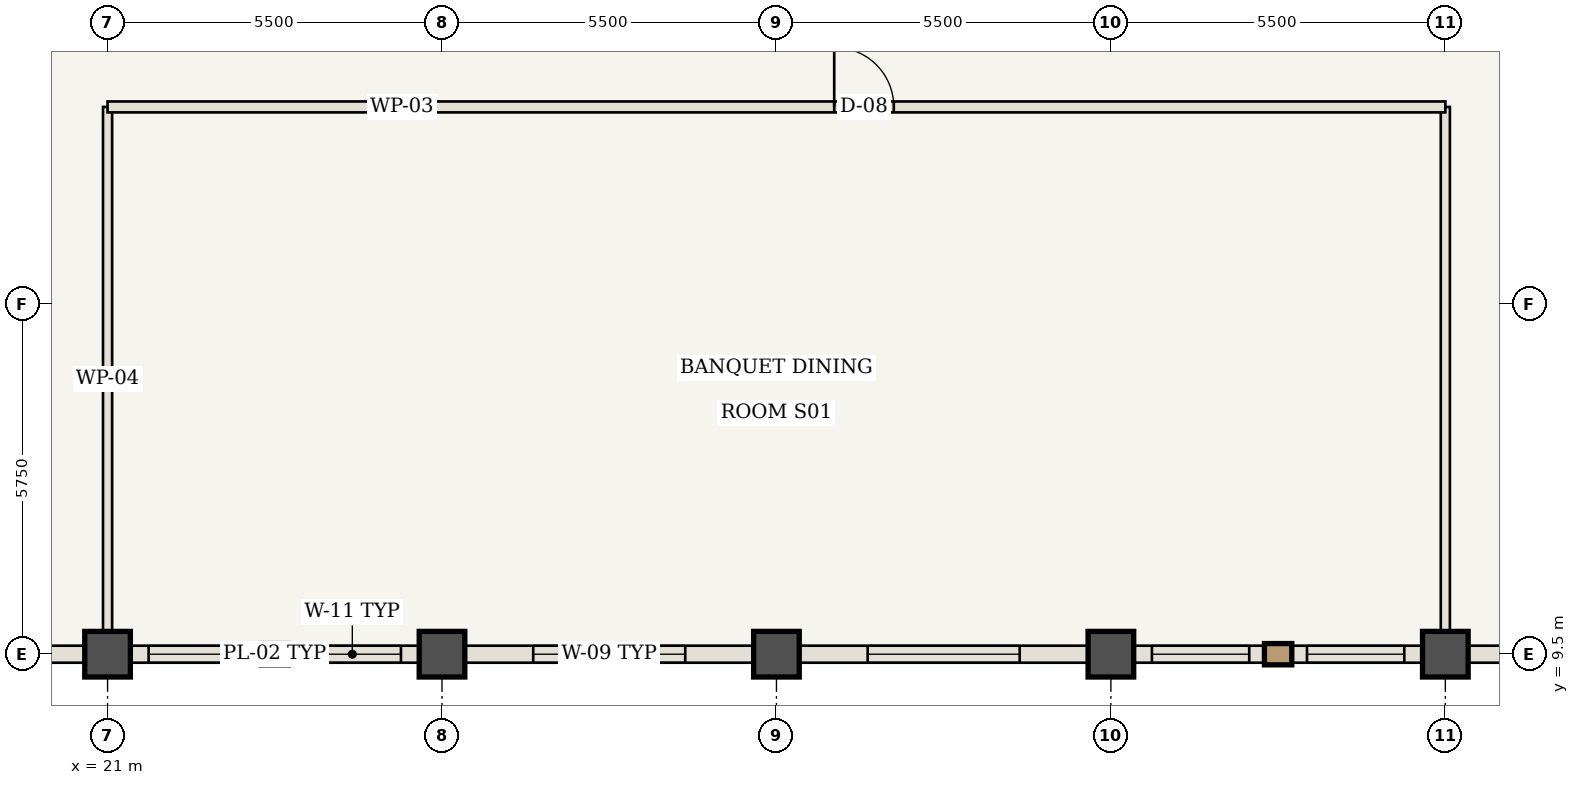
"""IFC4 building model, lengths in metres.
Left out: names, types, materials, properties, quantities, classifications, styles, units other than length and angle.
Written with IfcOpenShell. Run it as: python <this file> out.ifc"""

import sys

from ifc_helpers import new_model, si_unit, direction, frame, frame_2d, origin, origin_2d, place, context, subcontext, project, spatial, rectangle, extrude, element, fill, save


model = new_model("IFC4")
c1 = context("Model", 3, precision=1e-05, world=origin(), true_north=direction((0.0, 1.0)))
c2 = subcontext(c1, "Body", "Model", "MODEL_VIEW")
j1 = project(units=[si_unit("LENGTHUNIT", "METRE"), si_unit("PLANEANGLEUNIT", "RADIAN")], contexts=[c1])
p1 = place(None, origin())
s1 = spatial("IfcSite", under=j1, at=p1, CompositionType="ELEMENT")
p2 = place(p1, origin())
s2 = spatial("IfcBuilding", under=s1, at=p2, CompositionType="ELEMENT")
p3 = place(p2, frame((0.0, 0.0, 300.65)))
s3 = spatial("IfcBuildingStorey", under=s2, at=p3, CompositionType="ELEMENT", Elevation=300.65)
for number, where, z_axis, x_axis in (
    (1, (21.0, 9.5, 0.0), (0.0, 0.0, 1.0), (1.0, 0.0, 0.0)),
    (2, (26.5, 9.5, 0.0), (0.0, 0.0, 1.0), (1.0, 0.0, 0.0)),
    (3, (32.0, 9.5, 0.0), (0.0, 0.0, 1.0), (1.0, 0.0, 0.0)),
    (4, (37.5, 9.5, 0.0), (0.0, 0.0, 1.0), (1.0, 0.0, 0.0)),
    (5, (43.0, 9.5, 0.0), (0.0, 0.0, 1.0), (1.0, 0.0, 0.0)),
):
    element("IfcColumn", number, at=place(p3, frame(where, z_axis=z_axis, x_axis=x_axis)), inside=s3, PredefinedType="COLUMN", context=c2, shape_type="SweptSolid", body=[
        extrude(rectangle(XDim=0.75, YDim=0.75, at=origin_2d()), origin(), (0.0, 0.0, 1.0), 3.85),
    ])
for number, where, z_axis, x_axis in (
    (6, (21.0, 9.56, 0.0), (0.0, 0.0, 1.0), (0.0, 1.0, 0.0)),
    (7, (43.0, 9.56, 0.0), (0.0, 0.0, 1.0), (0.0, 1.0, 0.0)),
):
    element("IfcWall", number, at=place(p3, frame(where, z_axis=z_axis, x_axis=x_axis)), inside=s3, PredefinedType="STANDARD", context=c2, shape_type="SweptSolid", body=[
        extrude(rectangle(XDim=8.94, YDim=0.15, at=frame_2d((4.47, 0.0))), origin(), (0.0, 0.0, 1.0), 3.685),
    ])
p4 = place(p3, frame((21.0, 18.5, 0.0), z_axis=(0.0, 0.0, 1.0), x_axis=(1.0, 0.0, 0.0)))
e8 = element("IfcWall", 8, at=p4, inside=s3, PredefinedType="STANDARD", context=c2, shape_type="SweptSolid", body=[
    extrude(rectangle(XDim=22.0, YDim=0.18, at=frame_2d((11.0, 0.0))), origin(), (0.0, 0.0, 1.0), 3.685),
])
p5 = place(p4, frame((11.95, 0.0, 0.0)))
e9 = element("IfcOpeningElement", 9, at=p5, cuts=e8, PredefinedType="OPENING", context=c2, shape_type="SweptSolid", body=[
    extrude(rectangle(XDim=0.98, YDim=2.2, at=frame_2d((0.49, 1.1))), frame((0.0, 0.1, 0.0), z_axis=(0.0, -1.0, 0.0), x_axis=(1.0, 0.0, 0.0)), (0.0, 0.0, 1.0), 0.2),
])
p6 = place(p3, frame((21.0, 9.5, 0.0), z_axis=(0.0, 0.0, 1.0), x_axis=(-1.0, 0.0, 0.0)))
e10 = element("IfcWall", 10, at=p6, inside=s3, PredefinedType="USERDEFINED", context=c2, shape_type="SweptSolid", body=[
    extrude(rectangle(XDim=5.5, YDim=0.28, at=frame_2d((2.75, 0.0))), origin(), (0.0, 0.0, 1.0), 2.985),
])
p7 = place(p3, frame((26.5, 9.5, 0.0), z_axis=(0.0, 0.0, 1.0), x_axis=(-1.0, 0.0, 0.0)))
e11 = element("IfcWall", 11, at=p7, inside=s3, PredefinedType="USERDEFINED", context=c2, shape_type="SweptSolid", body=[
    extrude(rectangle(XDim=5.5, YDim=0.28, at=frame_2d((2.75, 0.0))), origin(), (0.0, 0.0, 1.0), 2.985),
])
p8 = place(p7, frame((0.675, 0.0, 0.85)))
e12 = element("IfcOpeningElement", 12, at=p8, cuts=e11, PredefinedType="OPENING", context=c2, shape_type="SweptSolid", body=[
    extrude(rectangle(XDim=1.6, YDim=1.935, at=frame_2d((0.8, 0.968))), frame((0.0, 0.15, 0.0), z_axis=(0.0, -1.0, 0.0), x_axis=(1.0, 0.0, 0.0)), (0.0, 0.0, 1.0), 0.3),
])
p9 = place(p7, frame((3.225, 0.0, 0.85)))
e13 = element("IfcOpeningElement", 13, at=p9, cuts=e11, PredefinedType="OPENING", context=c2, shape_type="SweptSolid", body=[
    extrude(rectangle(XDim=1.6, YDim=1.935, at=frame_2d((0.8, 0.968))), frame((0.0, 0.15, 0.0), z_axis=(0.0, -1.0, 0.0), x_axis=(1.0, 0.0, 0.0)), (0.0, 0.0, 1.0), 0.3),
])
p10 = place(p3, frame((32.0, 9.5, 0.0), z_axis=(0.0, 0.0, 1.0), x_axis=(-1.0, 0.0, 0.0)))
e14 = element("IfcWall", 14, at=p10, inside=s3, PredefinedType="USERDEFINED", context=c2, shape_type="SweptSolid", body=[
    extrude(rectangle(XDim=5.5, YDim=0.28, at=frame_2d((2.75, 0.0))), origin(), (0.0, 0.0, 1.0), 2.985),
])
p11 = place(p10, frame((1.5, 0.0, 0.85)))
e15 = element("IfcOpeningElement", 15, at=p11, cuts=e14, PredefinedType="OPENING", context=c2, shape_type="SweptSolid", body=[
    extrude(rectangle(XDim=2.5, YDim=1.935, at=frame_2d((1.25, 0.968))), frame((0.0, 0.15, 0.0), z_axis=(0.0, -1.0, 0.0), x_axis=(1.0, 0.0, 0.0)), (0.0, 0.0, 1.0), 0.3),
])
p12 = place(p3, frame((37.5, 9.5, 0.0), z_axis=(0.0, 0.0, 1.0), x_axis=(-1.0, 0.0, 0.0)))
e16 = element("IfcWall", 16, at=p12, inside=s3, PredefinedType="USERDEFINED", context=c2, shape_type="SweptSolid", body=[
    extrude(rectangle(XDim=5.5, YDim=0.28, at=frame_2d((2.75, 0.0))), origin(), (0.0, 0.0, 1.0), 2.985),
])
p13 = place(p12, frame((1.5, 0.0, 0.85)))
e17 = element("IfcOpeningElement", 17, at=p13, cuts=e16, PredefinedType="OPENING", context=c2, shape_type="SweptSolid", body=[
    extrude(rectangle(XDim=2.5, YDim=1.935, at=frame_2d((1.25, 0.968))), frame((0.0, 0.15, 0.0), z_axis=(0.0, -1.0, 0.0), x_axis=(1.0, 0.0, 0.0)), (0.0, 0.0, 1.0), 0.3),
])
p14 = place(p3, frame((43.0, 9.5, 0.0), z_axis=(0.0, 0.0, 1.0), x_axis=(-1.0, 0.0, 0.0)))
e18 = element("IfcWall", 18, at=p14, inside=s3, PredefinedType="USERDEFINED", context=c2, shape_type="SweptSolid", body=[
    extrude(rectangle(XDim=5.5, YDim=0.28, at=frame_2d((2.75, 0.0))), origin(), (0.0, 0.0, 1.0), 2.985),
])
p15 = place(p14, frame((0.675, 0.0, 0.85)))
e19 = element("IfcOpeningElement", 19, at=p15, cuts=e18, PredefinedType="OPENING", context=c2, shape_type="SweptSolid", body=[
    extrude(rectangle(XDim=1.6, YDim=1.935, at=frame_2d((0.8, 0.968))), frame((0.0, 0.15, 0.0), z_axis=(0.0, -1.0, 0.0), x_axis=(1.0, 0.0, 0.0)), (0.0, 0.0, 1.0), 0.3),
])
p16 = place(p14, frame((3.225, 0.0, 0.85)))
e20 = element("IfcOpeningElement", 20, at=p16, cuts=e18, PredefinedType="OPENING", context=c2, shape_type="SweptSolid", body=[
    extrude(rectangle(XDim=1.6, YDim=1.935, at=frame_2d((0.8, 0.968))), frame((0.0, 0.15, 0.0), z_axis=(0.0, -1.0, 0.0), x_axis=(1.0, 0.0, 0.0)), (0.0, 0.0, 1.0), 0.3),
])
p17 = place(p3, frame((48.5, 9.5, 0.0), z_axis=(0.0, 0.0, 1.0), x_axis=(-1.0, 0.0, 0.0)))
e21 = element("IfcWall", 21, at=p17, inside=s3, PredefinedType="USERDEFINED", context=c2, shape_type="SweptSolid", body=[
    extrude(rectangle(XDim=5.5, YDim=0.28, at=frame_2d((2.75, 0.0))), origin(), (0.0, 0.0, 1.0), 2.985),
])
p18 = place(p5, origin())
e22 = element("IfcDoor", 22, at=p18, inside=s3, OperationType="SINGLE_SWING_LEFT", PredefinedType="DOOR", context=c2, shape_type="SweptSolid", body=[
    extrude(rectangle(XDim=0.98, YDim=2.2, at=frame_2d((0.49, 1.1))), frame((0.0, 0.025, 0.0), z_axis=(0.0, -1.0, 0.0), x_axis=(1.0, 0.0, 0.0)), (0.0, 0.0, 1.0), 0.05),
])
fill(e9, e22)
p19 = place(p8, origin())
e23 = element("IfcWindow", 23, at=p19, inside=s3, PartitioningType="SINGLE_PANEL", PredefinedType="WINDOW", context=c2, shape_type="SweptSolid", body=[
    extrude(rectangle(XDim=1.6, YDim=1.935, at=frame_2d((0.8, 0.968))), frame((0.0, 0.03, 0.0), z_axis=(0.0, -1.0, 0.0), x_axis=(1.0, 0.0, 0.0)), (0.0, 0.0, 1.0), 0.06),
])
fill(e12, e23)
p20 = place(p9, origin())
e24 = element("IfcWindow", 24, at=p20, inside=s3, PartitioningType="SINGLE_PANEL", PredefinedType="WINDOW", context=c2, shape_type="SweptSolid", body=[
    extrude(rectangle(XDim=1.6, YDim=1.935, at=frame_2d((0.8, 0.968))), frame((0.0, 0.03, 0.0), z_axis=(0.0, -1.0, 0.0), x_axis=(1.0, 0.0, 0.0)), (0.0, 0.0, 1.0), 0.06),
])
fill(e13, e24)
p21 = place(p11, origin())
e25 = element("IfcWindow", 25, at=p21, inside=s3, PartitioningType="SINGLE_PANEL", PredefinedType="WINDOW", context=c2, shape_type="SweptSolid", body=[
    extrude(rectangle(XDim=2.5, YDim=1.935, at=frame_2d((1.25, 0.968))), frame((0.0, 0.03, 0.0), z_axis=(0.0, -1.0, 0.0), x_axis=(1.0, 0.0, 0.0)), (0.0, 0.0, 1.0), 0.06),
])
fill(e15, e25)
p22 = place(p13, origin())
e26 = element("IfcWindow", 26, at=p22, inside=s3, PartitioningType="SINGLE_PANEL", PredefinedType="WINDOW", context=c2, shape_type="SweptSolid", body=[
    extrude(rectangle(XDim=2.5, YDim=1.935, at=frame_2d((1.25, 0.968))), frame((0.0, 0.03, 0.0), z_axis=(0.0, -1.0, 0.0), x_axis=(1.0, 0.0, 0.0)), (0.0, 0.0, 1.0), 0.06),
])
fill(e17, e26)
p23 = place(p15, origin())
e27 = element("IfcWindow", 27, at=p23, inside=s3, PartitioningType="SINGLE_PANEL", PredefinedType="WINDOW", context=c2, shape_type="SweptSolid", body=[
    extrude(rectangle(XDim=1.6, YDim=1.935, at=frame_2d((0.8, 0.968))), frame((0.0, 0.03, 0.0), z_axis=(0.0, -1.0, 0.0), x_axis=(1.0, 0.0, 0.0)), (0.0, 0.0, 1.0), 0.06),
])
fill(e19, e27)
p24 = place(p16, origin())
e28 = element("IfcWindow", 28, at=p24, inside=s3, PartitioningType="SINGLE_PANEL", PredefinedType="WINDOW", context=c2, shape_type="SweptSolid", body=[
    extrude(rectangle(XDim=1.6, YDim=1.935, at=frame_2d((0.8, 0.968))), frame((0.0, 0.03, 0.0), z_axis=(0.0, -1.0, 0.0), x_axis=(1.0, 0.0, 0.0)), (0.0, 0.0, 1.0), 0.06),
])
fill(e20, e28)
save(model, sys.argv[1])
